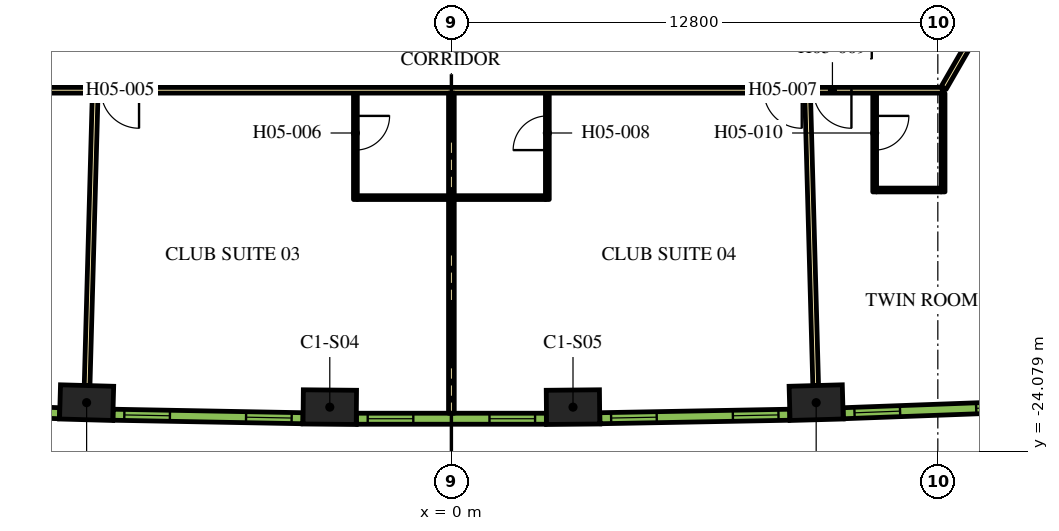
"""IFC4 building model, lengths in metres.
Left out: names, types, materials, properties, quantities, classifications, styles, units other than length and angle.
Written with IfcOpenShell. Run it as: python <this file> out.ifc"""

import sys

from ifc_helpers import new_model, si_unit, direction, frame, frame_2d, origin, origin_2d, place, context, subcontext, project, spatial, rectangle, extrude, element, fill, save


model = new_model("IFC4")
c1 = context("Model", 3, precision=1e-05, world=origin(), true_north=direction((0.0, 1.0)))
c2 = subcontext(c1, "Body", "Model", "MODEL_VIEW")
j1 = project(units=[si_unit("LENGTHUNIT", "METRE"), si_unit("PLANEANGLEUNIT", "RADIAN")], contexts=[c1])
p1 = place(None, origin())
s1 = spatial("IfcSite", under=j1, at=p1, CompositionType="ELEMENT")
p2 = place(p1, origin())
s2 = spatial("IfcBuilding", under=s1, at=p2, CompositionType="ELEMENT")
p3 = place(p2, frame((0.0, 0.0, 74.4)))
s3 = spatial("IfcBuildingStorey", under=s2, at=p3, CompositionType="ELEMENT", Elevation=74.4)
for number, where, z_axis, x_axis in (
    (1, (-9.599, -22.795, 0.0), (0.0, 0.0, 1.0), (1.0, -0.028, 0.0)),
    (2, (-3.2, -22.913, 0.0), (0.0, 0.0, 1.0), (1.0, -0.009, 0.0)),
    (3, (3.2, -22.913, 0.0), (0.0, 0.0, 1.0), (1.0, 0.009, 0.0)),
    (4, (9.599, -22.795, 0.0), (0.0, 0.0, 1.0), (1.0, 0.028, 0.0)),
):
    element("IfcColumn", number, at=place(p3, frame(where, z_axis=z_axis, x_axis=x_axis)), inside=s3, PredefinedType="COLUMN", context=c2, shape_type="SweptSolid", body=[
        extrude(rectangle(XDim=1.4, YDim=0.9, at=origin_2d()), origin(), (0.0, 0.0, 1.0), 3.9),
    ])
p4 = place(p3, frame((12.918, -14.575, 0.0), z_axis=(0.0, 0.0, 1.0), x_axis=(-1.0, 0.0, 0.0)))
e5 = element("IfcWall", 5, at=p4, inside=s3, PredefinedType="PARTITIONING", context=c2, shape_type="SweptSolid", body=[
    extrude(rectangle(XDim=25.766, YDim=0.15, at=frame_2d((12.883, 0.0))), origin(), (0.0, 0.0, 1.0), 2.7),
])
p5 = place(p4, frame((21.137, 0.0, 0.0)))
e6 = element("IfcOpeningElement", 6, at=p5, cuts=e5, PredefinedType="OPENING", context=c2, shape_type="SweptSolid", body=[
    extrude(rectangle(XDim=1.0, YDim=2.1, at=frame_2d((0.5, 1.05))), frame((0.0, 0.085, 0.0), z_axis=(0.0, -1.0, 0.0), x_axis=(1.0, 0.0, 0.0)), (0.0, 0.0, 1.0), 0.17),
])
p6 = place(p4, frame((3.699, 0.0, 0.0)))
e7 = element("IfcOpeningElement", 7, at=p6, cuts=e5, PredefinedType="OPENING", context=c2, shape_type="SweptSolid", body=[
    extrude(rectangle(XDim=1.0, YDim=2.1, at=frame_2d((0.5, 1.05))), frame((0.0, 0.085, 0.0), z_axis=(0.0, -1.0, 0.0), x_axis=(1.0, 0.0, 0.0)), (0.0, 0.0, 1.0), 0.17),
])
p7 = place(p4, frame((2.392, 0.0, 0.0)))
e8 = element("IfcOpeningElement", 8, at=p7, cuts=e5, PredefinedType="OPENING", context=c2, shape_type="SweptSolid", body=[
    extrude(rectangle(XDim=1.0, YDim=2.1, at=frame_2d((0.5, 1.05))), frame((0.0, 0.085, 0.0), z_axis=(0.0, -1.0, 0.0), x_axis=(1.0, 0.0, 0.0)), (0.0, 0.0, 1.0), 0.17),
])
p8 = place(p3, frame((15.587, -9.952, 0.0), z_axis=(0.0, 0.0, 1.0), x_axis=(-0.500016618951, -0.866015808616, 0.0)))
e9 = element("IfcWall", 9, at=p8, inside=s3, PredefinedType="PARTITIONING", context=c2, shape_type="SweptSolid", body=[
    extrude(rectangle(XDim=5.268, YDim=0.15, at=frame_2d((2.634, 0.0))), origin(), (0.0, 0.0, 1.0), 2.7),
])
p9 = place(p3, frame((-9.586, -22.345, 0.0), z_axis=(0.0, 0.0, 1.0), x_axis=(0.027722115646, 0.999615668297, 0.0)))
e10 = element("IfcWall", 10, at=p9, inside=s3, PredefinedType="PARTITIONING", context=c2, shape_type="SweptSolid", body=[
    extrude(rectangle(XDim=7.688, YDim=0.15, at=frame_2d((3.844, 0.0))), origin(), (0.0, 0.0, 1.0), 2.7),
])
p10 = place(p3, frame((0.0, -23.073, 0.0), z_axis=(0.0, 0.0, 1.0), x_axis=(0.0, 1.0, 0.0)))
e11 = element("IfcWall", 11, at=p10, inside=s3, PredefinedType="PARTITIONING", context=c2, shape_type="SweptSolid", body=[
    extrude(rectangle(XDim=8.423, YDim=0.15, at=frame_2d((4.212, 0.0))), origin(), (0.0, 0.0, 1.0), 2.7),
])
p11 = place(p3, frame((9.586, -22.345, 0.0), z_axis=(0.0, 0.0, 1.0), x_axis=(-0.027722115646, 0.999615668297, 0.0)))
e12 = element("IfcWall", 12, at=p11, inside=s3, PredefinedType="PARTITIONING", context=c2, shape_type="SweptSolid", body=[
    extrude(rectangle(XDim=7.688, YDim=0.15, at=frame_2d((3.844, 0.0))), origin(), (0.0, 0.0, 1.0), 2.7),
])
p12 = place(p3, frame((-2.526, -14.65, 0.0), z_axis=(0.0, 0.0, 1.0), x_axis=(0.0, -1.0, 0.0)))
e13 = element("IfcWall", 13, at=p12, inside=s3, PredefinedType="PARTITIONING", context=c2, shape_type="SweptSolid", body=[
    extrude(rectangle(XDim=2.8, YDim=0.1, at=frame_2d((1.4, 0.0))), origin(), (0.0, 0.0, 1.0), 2.7),
])
p13 = place(p12, frame((0.6, 0.0, 0.0)))
e14 = element("IfcOpeningElement", 14, at=p13, cuts=e13, PredefinedType="OPENING", context=c2, shape_type="SweptSolid", body=[
    extrude(rectangle(XDim=0.9, YDim=2.1, at=frame_2d((0.45, 1.05))), frame((0.0, 0.06, 0.0), z_axis=(0.0, -1.0, 0.0), x_axis=(1.0, 0.0, 0.0)), (0.0, 0.0, 1.0), 0.12),
])
p14 = place(p3, frame((-2.476, -17.4, 0.0), z_axis=(0.0, 0.0, 1.0), x_axis=(1.0, 0.0, 0.0)))
e15 = element("IfcWall", 15, at=p14, inside=s3, PredefinedType="PARTITIONING", context=c2, shape_type="SweptSolid", body=[
    extrude(rectangle(XDim=2.4, YDim=0.1, at=frame_2d((1.2, 0.0))), origin(), (0.0, 0.0, 1.0), 2.7),
])
p15 = place(p3, frame((2.525, -17.45, 0.0), z_axis=(0.0, 0.0, 1.0), x_axis=(0.0, 1.0, 0.0)))
e16 = element("IfcWall", 16, at=p15, inside=s3, PredefinedType="PARTITIONING", context=c2, shape_type="SweptSolid", body=[
    extrude(rectangle(XDim=2.8, YDim=0.1, at=frame_2d((1.4, 0.0))), origin(), (0.0, 0.0, 1.0), 2.7),
])
p16 = place(p15, frame((1.3, 0.0, 0.0)))
e17 = element("IfcOpeningElement", 17, at=p16, cuts=e16, PredefinedType="OPENING", context=c2, shape_type="SweptSolid", body=[
    extrude(rectangle(XDim=0.9, YDim=2.1, at=frame_2d((0.45, 1.05))), frame((0.0, 0.06, 0.0), z_axis=(0.0, -1.0, 0.0), x_axis=(1.0, 0.0, 0.0)), (0.0, 0.0, 1.0), 0.12),
])
p17 = place(p3, frame((2.475, -17.4, 0.0), z_axis=(0.0, 0.0, 1.0), x_axis=(-1.0, 0.0, 0.0)))
e18 = element("IfcWall", 18, at=p17, inside=s3, PredefinedType="PARTITIONING", context=c2, shape_type="SweptSolid", body=[
    extrude(rectangle(XDim=2.4, YDim=0.1, at=frame_2d((1.2, 0.0))), origin(), (0.0, 0.0, 1.0), 2.7),
])
p18 = place(p3, frame((11.138, -14.65, 0.0), z_axis=(0.0, 0.0, 1.0), x_axis=(0.0, -1.0, 0.0)))
e19 = element("IfcWall", 19, at=p18, inside=s3, PredefinedType="PARTITIONING", context=c2, shape_type="SweptSolid", body=[
    extrude(rectangle(XDim=2.6, YDim=0.1, at=frame_2d((1.3, 0.0))), origin(), (0.0, 0.0, 1.0), 2.7),
])
p19 = place(p18, frame((0.6, 0.0, 0.0)))
e20 = element("IfcOpeningElement", 20, at=p19, cuts=e19, PredefinedType="OPENING", context=c2, shape_type="SweptSolid", body=[
    extrude(rectangle(XDim=0.9, YDim=2.1, at=frame_2d((0.45, 1.05))), frame((0.0, 0.06, 0.0), z_axis=(0.0, -1.0, 0.0), x_axis=(1.0, 0.0, 0.0)), (0.0, 0.0, 1.0), 0.12),
])
p20 = place(p3, frame((11.188, -17.2, 0.0), z_axis=(0.0, 0.0, 1.0), x_axis=(1.0, 0.0, 0.0)))
e21 = element("IfcWall", 21, at=p20, inside=s3, PredefinedType="PARTITIONING", context=c2, shape_type="SweptSolid", body=[
    extrude(rectangle(XDim=1.7, YDim=0.1, at=frame_2d((0.85, 0.0))), origin(), (0.0, 0.0, 1.0), 2.7),
])
p21 = place(p3, frame((12.938, -14.65, 0.0), z_axis=(0.0, 0.0, 1.0), x_axis=(0.0, -1.0, 0.0)))
e22 = element("IfcWall", 22, at=p21, inside=s3, PredefinedType="PARTITIONING", context=c2, shape_type="SweptSolid", body=[
    extrude(rectangle(XDim=2.6, YDim=0.1, at=frame_2d((1.3, 0.0))), origin(), (0.0, 0.0, 1.0), 2.7),
])
p22 = place(p3, frame((-15.305, -22.889, 0.0), z_axis=(0.0, 0.0, 1.0), x_axis=(0.999317974969, -0.036926750529, 0.0)))
e23 = element("IfcWall", 23, at=p22, inside=s3, PredefinedType="SOLIDWALL", context=c2, shape_type="SweptSolid", body=[
    extrude(rectangle(XDim=4.998, YDim=0.29, at=frame_2d((2.499, 0.0))), origin(), (0.0, 0.0, 1.0), 3.6),
])
p23 = place(p22, frame((0.297, 0.0, 0.9)))
e24 = element("IfcOpeningElement", 24, at=p23, cuts=e23, PredefinedType="OPENING", context=c2, shape_type="SweptSolid", body=[
    extrude(rectangle(XDim=1.2, YDim=2.15, at=frame_2d((0.6, 1.075))), frame((0.0, 0.155, 0.0), z_axis=(0.0, -1.0, 0.0), x_axis=(1.0, 0.0, 0.0)), (0.0, 0.0, 1.0), 0.31),
])
p24 = place(p22, frame((3.501, 0.0, 0.9)))
e25 = element("IfcOpeningElement", 25, at=p24, cuts=e23, PredefinedType="OPENING", context=c2, shape_type="SweptSolid", body=[
    extrude(rectangle(XDim=1.2, YDim=2.15, at=frame_2d((0.6, 1.075))), frame((0.0, 0.155, 0.0), z_axis=(0.0, -1.0, 0.0), x_axis=(1.0, 0.0, 0.0)), (0.0, 0.0, 1.0), 0.31),
])
p25 = place(p3, frame((-8.904, -23.113, 0.0), z_axis=(0.0, 0.0, 1.0), x_axis=(0.999829529479, -0.018463801951, 0.0)))
e26 = element("IfcWall", 26, at=p25, inside=s3, PredefinedType="SOLIDWALL", context=c2, shape_type="SweptSolid", body=[
    extrude(rectangle(XDim=4.998, YDim=0.29, at=frame_2d((2.499, 0.0))), origin(), (0.0, 0.0, 1.0), 3.6),
])
p26 = place(p25, frame((0.297, 0.0, 0.9)))
e27 = element("IfcOpeningElement", 27, at=p26, cuts=e26, PredefinedType="OPENING", context=c2, shape_type="SweptSolid", body=[
    extrude(rectangle(XDim=1.2, YDim=2.15, at=frame_2d((0.6, 1.075))), frame((0.0, 0.155, 0.0), z_axis=(0.0, -1.0, 0.0), x_axis=(1.0, 0.0, 0.0)), (0.0, 0.0, 1.0), 0.31),
])
p27 = place(p25, frame((3.501, 0.0, 0.9)))
e28 = element("IfcOpeningElement", 28, at=p27, cuts=e26, PredefinedType="OPENING", context=c2, shape_type="SweptSolid", body=[
    extrude(rectangle(XDim=1.2, YDim=2.15, at=frame_2d((0.6, 1.075))), frame((0.0, 0.155, 0.0), z_axis=(0.0, -1.0, 0.0), x_axis=(1.0, 0.0, 0.0)), (0.0, 0.0, 1.0), 0.31),
])
p28 = place(p3, frame((-2.499, -23.218, 0.0), z_axis=(0.0, 0.0, 1.0), x_axis=(1.0, 0.0, 0.0)))
e29 = element("IfcWall", 29, at=p28, inside=s3, PredefinedType="SOLIDWALL", context=c2, shape_type="SweptSolid", body=[
    extrude(rectangle(XDim=4.998, YDim=0.29, at=frame_2d((2.499, 0.0))), origin(), (0.0, 0.0, 1.0), 3.6),
])
p29 = place(p28, frame((0.297, 0.0, 0.9)))
e30 = element("IfcOpeningElement", 30, at=p29, cuts=e29, PredefinedType="OPENING", context=c2, shape_type="SweptSolid", body=[
    extrude(rectangle(XDim=1.2, YDim=2.15, at=frame_2d((0.6, 1.075))), frame((0.0, 0.155, 0.0), z_axis=(0.0, -1.0, 0.0), x_axis=(1.0, 0.0, 0.0)), (0.0, 0.0, 1.0), 0.31),
])
p30 = place(p28, frame((3.501, 0.0, 0.9)))
e31 = element("IfcOpeningElement", 31, at=p30, cuts=e29, PredefinedType="OPENING", context=c2, shape_type="SweptSolid", body=[
    extrude(rectangle(XDim=1.2, YDim=2.15, at=frame_2d((0.6, 1.075))), frame((0.0, 0.155, 0.0), z_axis=(0.0, -1.0, 0.0), x_axis=(1.0, 0.0, 0.0)), (0.0, 0.0, 1.0), 0.31),
])
p31 = place(p3, frame((3.906, -23.205, 0.0), z_axis=(0.0, 0.0, 1.0), x_axis=(0.999829529479, 0.018463801951, 0.0)))
e32 = element("IfcWall", 32, at=p31, inside=s3, PredefinedType="SOLIDWALL", context=c2, shape_type="SweptSolid", body=[
    extrude(rectangle(XDim=4.998, YDim=0.29, at=frame_2d((2.499, 0.0))), origin(), (0.0, 0.0, 1.0), 3.6),
])
p32 = place(p31, frame((0.297, 0.0, 0.9)))
e33 = element("IfcOpeningElement", 33, at=p32, cuts=e32, PredefinedType="OPENING", context=c2, shape_type="SweptSolid", body=[
    extrude(rectangle(XDim=1.2, YDim=2.15, at=frame_2d((0.6, 1.075))), frame((0.0, 0.155, 0.0), z_axis=(0.0, -1.0, 0.0), x_axis=(1.0, 0.0, 0.0)), (0.0, 0.0, 1.0), 0.31),
])
p33 = place(p31, frame((3.501, 0.0, 0.9)))
e34 = element("IfcOpeningElement", 34, at=p33, cuts=e32, PredefinedType="OPENING", context=c2, shape_type="SweptSolid", body=[
    extrude(rectangle(XDim=1.2, YDim=2.15, at=frame_2d((0.6, 1.075))), frame((0.0, 0.155, 0.0), z_axis=(0.0, -1.0, 0.0), x_axis=(1.0, 0.0, 0.0)), (0.0, 0.0, 1.0), 0.31),
])
p34 = place(p3, frame((10.31, -23.074, 0.0), z_axis=(0.0, 0.0, 1.0), x_axis=(0.999317974969, 0.036926750529, 0.0)))
e35 = element("IfcWall", 35, at=p34, inside=s3, PredefinedType="SOLIDWALL", context=c2, shape_type="SweptSolid", body=[
    extrude(rectangle(XDim=4.998, YDim=0.29, at=frame_2d((2.499, 0.0))), origin(), (0.0, 0.0, 1.0), 3.6),
])
p35 = place(p34, frame((0.297, 0.0, 0.9)))
e36 = element("IfcOpeningElement", 36, at=p35, cuts=e35, PredefinedType="OPENING", context=c2, shape_type="SweptSolid", body=[
    extrude(rectangle(XDim=1.2, YDim=2.15, at=frame_2d((0.6, 1.075))), frame((0.0, 0.155, 0.0), z_axis=(0.0, -1.0, 0.0), x_axis=(1.0, 0.0, 0.0)), (0.0, 0.0, 1.0), 0.31),
])
p36 = place(p34, frame((3.501, 0.0, 0.9)))
e37 = element("IfcOpeningElement", 37, at=p36, cuts=e35, PredefinedType="OPENING", context=c2, shape_type="SweptSolid", body=[
    extrude(rectangle(XDim=1.2, YDim=2.15, at=frame_2d((0.6, 1.075))), frame((0.0, 0.155, 0.0), z_axis=(0.0, -1.0, 0.0), x_axis=(1.0, 0.0, 0.0)), (0.0, 0.0, 1.0), 0.31),
])
p37 = place(p5, origin())
e38 = element("IfcDoor", 38, at=p37, inside=s3, OperationType="SINGLE_SWING_RIGHT", PredefinedType="DOOR", context=c2, shape_type="SweptSolid", body=[
    extrude(rectangle(XDim=1.0, YDim=2.1, at=frame_2d((0.5, 1.05))), frame((0.0, 0.025, 0.0), z_axis=(0.0, -1.0, 0.0), x_axis=(1.0, 0.0, 0.0)), (0.0, 0.0, 1.0), 0.05),
])
fill(e6, e38)
p38 = place(p13, origin())
e39 = element("IfcDoor", 39, at=p38, inside=s3, OperationType="SINGLE_SWING_RIGHT", PredefinedType="DOOR", context=c2, shape_type="SweptSolid", body=[
    extrude(rectangle(XDim=0.9, YDim=2.1, at=frame_2d((0.45, 1.05))), frame((0.0, 0.025, 0.0), z_axis=(0.0, -1.0, 0.0), x_axis=(1.0, 0.0, 0.0)), (0.0, 0.0, 1.0), 0.05),
])
fill(e14, e39)
p39 = place(p6, origin())
e40 = element("IfcDoor", 40, at=p39, inside=s3, OperationType="SINGLE_SWING_LEFT", PredefinedType="DOOR", context=c2, shape_type="SweptSolid", body=[
    extrude(rectangle(XDim=1.0, YDim=2.1, at=frame_2d((0.5, 1.05))), frame((0.0, 0.025, 0.0), z_axis=(0.0, -1.0, 0.0), x_axis=(1.0, 0.0, 0.0)), (0.0, 0.0, 1.0), 0.05),
])
fill(e7, e40)
p40 = place(p16, origin())
e41 = element("IfcDoor", 41, at=p40, inside=s3, OperationType="SINGLE_SWING_LEFT", PredefinedType="DOOR", context=c2, shape_type="SweptSolid", body=[
    extrude(rectangle(XDim=0.9, YDim=2.1, at=frame_2d((0.45, 1.05))), frame((0.0, 0.025, 0.0), z_axis=(0.0, -1.0, 0.0), x_axis=(1.0, 0.0, 0.0)), (0.0, 0.0, 1.0), 0.05),
])
fill(e17, e41)
p41 = place(p7, origin())
e42 = element("IfcDoor", 42, at=p41, inside=s3, OperationType="SINGLE_SWING_RIGHT", PredefinedType="DOOR", context=c2, shape_type="SweptSolid", body=[
    extrude(rectangle(XDim=1.0, YDim=2.1, at=frame_2d((0.5, 1.05))), frame((0.0, 0.025, 0.0), z_axis=(0.0, -1.0, 0.0), x_axis=(1.0, 0.0, 0.0)), (0.0, 0.0, 1.0), 0.05),
])
fill(e8, e42)
p42 = place(p19, origin())
e43 = element("IfcDoor", 43, at=p42, inside=s3, OperationType="SINGLE_SWING_LEFT", PredefinedType="DOOR", context=c2, shape_type="SweptSolid", body=[
    extrude(rectangle(XDim=0.9, YDim=2.1, at=frame_2d((0.45, 1.05))), frame((0.0, 0.025, 0.0), z_axis=(0.0, -1.0, 0.0), x_axis=(1.0, 0.0, 0.0)), (0.0, 0.0, 1.0), 0.05),
])
fill(e20, e43)
p43 = place(p26, origin())
e44 = element("IfcWindow", 44, at=p43, inside=s3, PartitioningType="DOUBLE_PANEL_VERTICAL", PredefinedType="WINDOW", context=c2, shape_type="SweptSolid", body=[
    extrude(rectangle(XDim=1.2, YDim=2.15, at=frame_2d((0.6, 1.075))), frame((0.0, 0.015, 0.0), z_axis=(0.0, -1.0, 0.0), x_axis=(1.0, 0.0, 0.0)), (0.0, 0.0, 1.0), 0.06),
])
fill(e27, e44)
p44 = place(p27, origin())
e45 = element("IfcWindow", 45, at=p44, inside=s3, PartitioningType="DOUBLE_PANEL_VERTICAL", PredefinedType="WINDOW", context=c2, shape_type="SweptSolid", body=[
    extrude(rectangle(XDim=1.2, YDim=2.15, at=frame_2d((0.6, 1.075))), frame((0.0, 0.015, 0.0), z_axis=(0.0, -1.0, 0.0), x_axis=(1.0, 0.0, 0.0)), (0.0, 0.0, 1.0), 0.06),
])
fill(e28, e45)
p45 = place(p29, origin())
e46 = element("IfcWindow", 46, at=p45, inside=s3, PartitioningType="DOUBLE_PANEL_VERTICAL", PredefinedType="WINDOW", context=c2, shape_type="SweptSolid", body=[
    extrude(rectangle(XDim=1.2, YDim=2.15, at=frame_2d((0.6, 1.075))), frame((0.0, 0.015, 0.0), z_axis=(0.0, -1.0, 0.0), x_axis=(1.0, 0.0, 0.0)), (0.0, 0.0, 1.0), 0.06),
])
fill(e30, e46)
p46 = place(p30, origin())
e47 = element("IfcWindow", 47, at=p46, inside=s3, PartitioningType="DOUBLE_PANEL_VERTICAL", PredefinedType="WINDOW", context=c2, shape_type="SweptSolid", body=[
    extrude(rectangle(XDim=1.2, YDim=2.15, at=frame_2d((0.6, 1.075))), frame((0.0, 0.015, 0.0), z_axis=(0.0, -1.0, 0.0), x_axis=(1.0, 0.0, 0.0)), (0.0, 0.0, 1.0), 0.06),
])
fill(e31, e47)
p47 = place(p32, origin())
e48 = element("IfcWindow", 48, at=p47, inside=s3, PartitioningType="DOUBLE_PANEL_VERTICAL", PredefinedType="WINDOW", context=c2, shape_type="SweptSolid", body=[
    extrude(rectangle(XDim=1.2, YDim=2.15, at=frame_2d((0.6, 1.075))), frame((0.0, 0.015, 0.0), z_axis=(0.0, -1.0, 0.0), x_axis=(1.0, 0.0, 0.0)), (0.0, 0.0, 1.0), 0.06),
])
fill(e33, e48)
p48 = place(p33, origin())
e49 = element("IfcWindow", 49, at=p48, inside=s3, PartitioningType="DOUBLE_PANEL_VERTICAL", PredefinedType="WINDOW", context=c2, shape_type="SweptSolid", body=[
    extrude(rectangle(XDim=1.2, YDim=2.15, at=frame_2d((0.6, 1.075))), frame((0.0, 0.015, 0.0), z_axis=(0.0, -1.0, 0.0), x_axis=(1.0, 0.0, 0.0)), (0.0, 0.0, 1.0), 0.06),
])
fill(e34, e49)
p49 = place(p35, origin())
e50 = element("IfcWindow", 50, at=p49, inside=s3, PartitioningType="DOUBLE_PANEL_VERTICAL", PredefinedType="WINDOW", context=c2, shape_type="SweptSolid", body=[
    extrude(rectangle(XDim=1.2, YDim=2.15, at=frame_2d((0.6, 1.075))), frame((0.0, 0.015, 0.0), z_axis=(0.0, -1.0, 0.0), x_axis=(1.0, 0.0, 0.0)), (0.0, 0.0, 1.0), 0.06),
])
fill(e36, e50)
p50 = place(p36, origin())
e51 = element("IfcWindow", 51, at=p50, inside=s3, PartitioningType="DOUBLE_PANEL_VERTICAL", PredefinedType="WINDOW", context=c2, shape_type="SweptSolid", body=[
    extrude(rectangle(XDim=1.2, YDim=2.15, at=frame_2d((0.6, 1.075))), frame((0.0, 0.015, 0.0), z_axis=(0.0, -1.0, 0.0), x_axis=(1.0, 0.0, 0.0)), (0.0, 0.0, 1.0), 0.06),
])
fill(e37, e51)
save(model, sys.argv[1])
